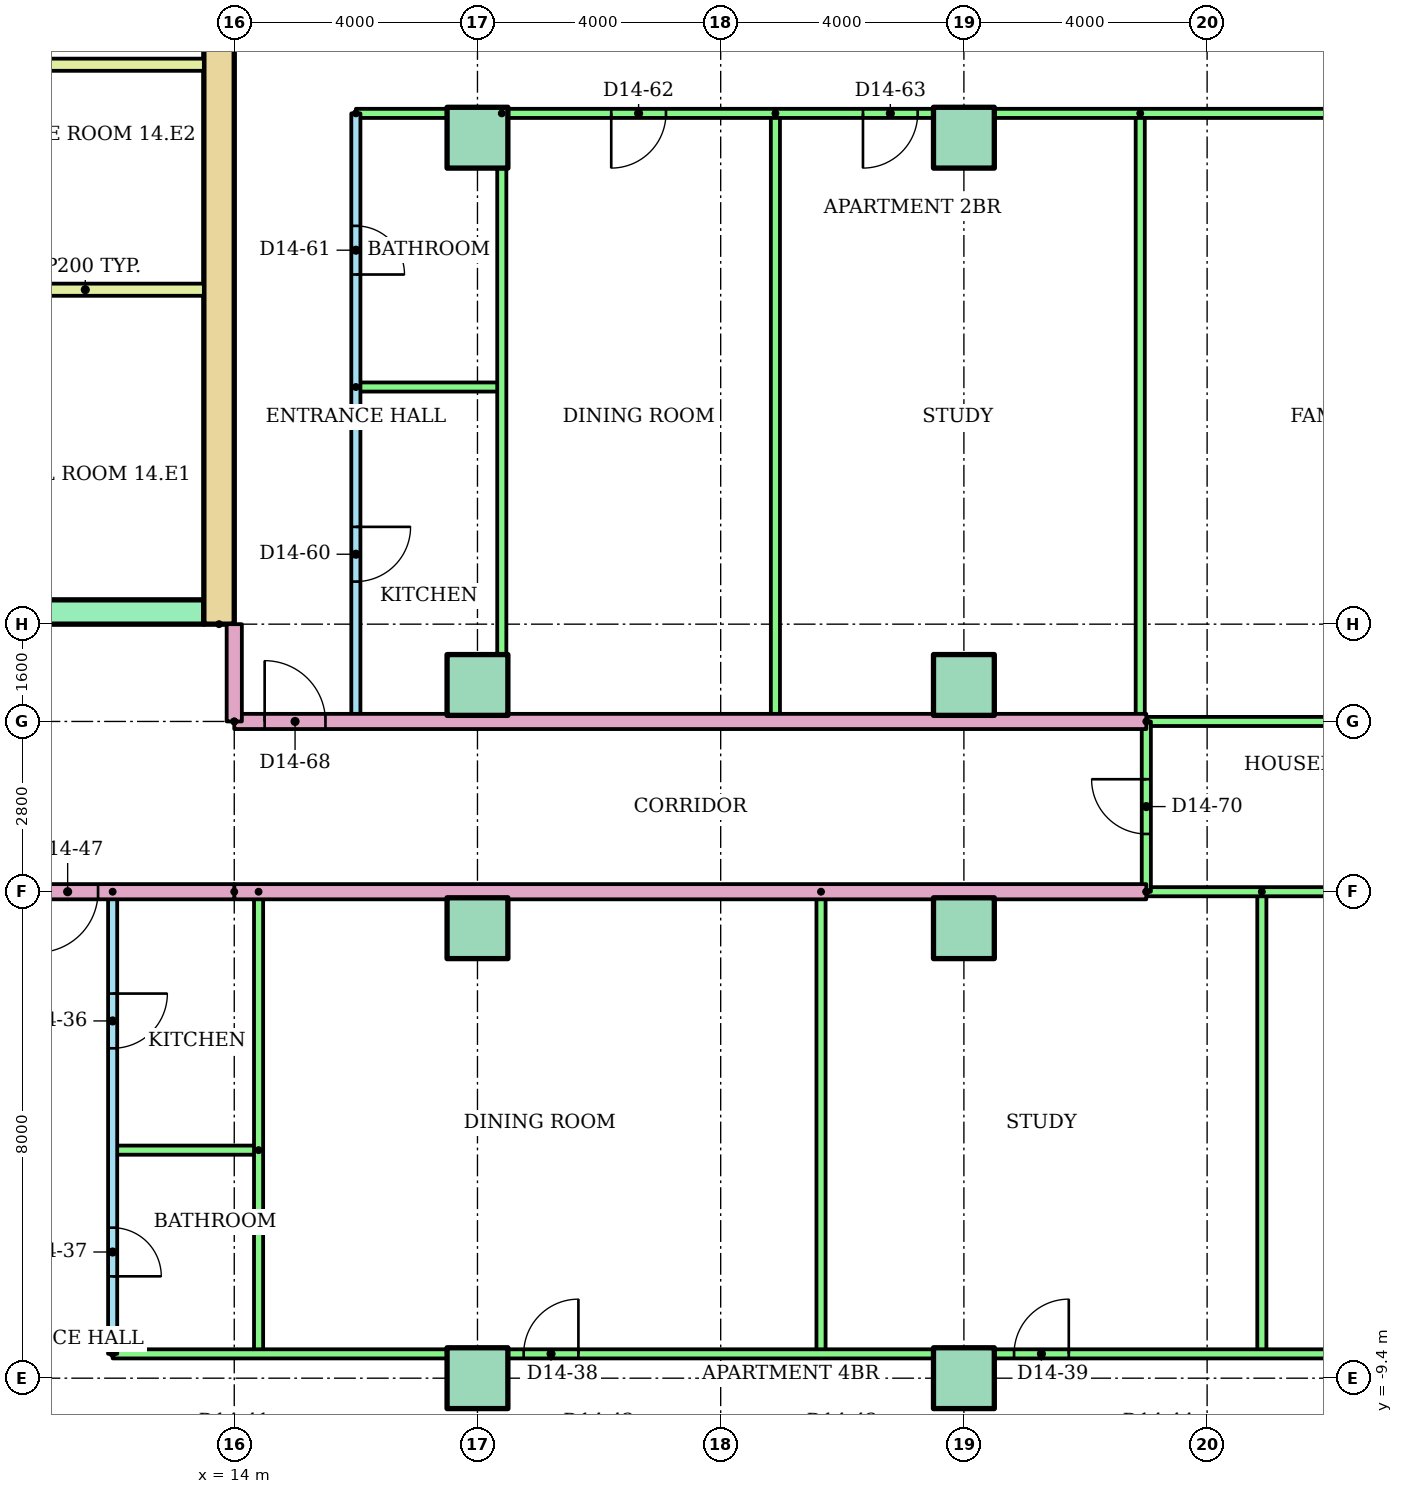
"""IFC4 building model, lengths in metres.
Left out: names, types, materials, properties, quantities, classifications, styles, units other than length and angle.
Written with IfcOpenShell. Run it as: python <this file> out.ifc"""

import sys

from ifc_helpers import new_model, si_unit, direction, frame, frame_2d, origin, origin_2d, place, context, subcontext, project, spatial, rectangle, extrude, element, fill, save


model = new_model("IFC4")
c1 = context("Model", 3, precision=1e-05, world=origin(), true_north=direction((0.0, 1.0)))
c2 = subcontext(c1, "Body", "Model", "MODEL_VIEW")
j1 = project(units=[si_unit("LENGTHUNIT", "METRE"), si_unit("PLANEANGLEUNIT", "RADIAN")], contexts=[c1])
p1 = place(None, origin())
s1 = spatial("IfcSite", under=j1, at=p1, CompositionType="ELEMENT")
p2 = place(p1, origin())
s2 = spatial("IfcBuilding", under=s1, at=p2, CompositionType="ELEMENT")
p3 = place(p2, frame((0.0, 0.0, 54.4)))
s3 = spatial("IfcBuildingStorey", under=s2, at=p3, CompositionType="ELEMENT", Elevation=54.4)
for number, where in (
    (1, (18.0, -9.4, 0.0)),
    (2, (26.0, -9.4, 0.0)),
    (3, (18.0, -2.0, 0.0)),
    (4, (26.0, -2.0, 0.0)),
    (5, (18.0, 2.0, 0.0)),
    (6, (26.0, 2.0, 0.0)),
    (7, (18.0, 11.0, 0.0)),
    (8, (26.0, 11.0, 0.0)),
):
    element("IfcColumn", number, at=place(p3, frame(where)), inside=s3, PredefinedType="COLUMN", context=c2, shape_type="SweptSolid", body=[
        extrude(rectangle(XDim=1.0, YDim=1.0, at=origin_2d()), origin(), (0.0, 0.0, 1.0), 3.2),
    ])
p4 = place(p3, frame((13.75, 3.0, 0.0), z_axis=(0.0, 0.0, 1.0), x_axis=(0.0, 1.0, 0.0)))
e9 = element("IfcWall", 9, at=p4, inside=s3, PredefinedType="SHEAR", context=c2, shape_type="SweptSolid", body=[
    extrude(rectangle(XDim=17.0, YDim=0.5, at=frame_2d((8.5, 0.0))), origin(), (0.0, 0.0, 1.0), 2.92),
])
p5 = place(p3, frame((-13.5, 3.2, 0.0)))
e10 = element("IfcWall", 10, at=p5, inside=s3, PredefinedType="SHEAR", context=c2, shape_type="SweptSolid", body=[
    extrude(rectangle(XDim=27.0, YDim=0.4, at=frame_2d((13.5, 0.0))), origin(), (0.0, 0.0, 1.0), 2.92),
])
p6 = place(p5, frame((6.861, 0.0, 0.0)))
e11 = element("IfcOpeningElement", 11, at=p6, cuts=e10, PredefinedType="OPENING", context=c2, shape_type="SweptSolid", body=[
    extrude(rectangle(XDim=1.1, YDim=2.1, at=frame_2d((0.55, 1.05))), frame((0.0, 0.21, 0.0), z_axis=(0.0, -1.0, 0.0), x_axis=(1.0, 0.0, 0.0)), (0.0, 0.0, 1.0), 0.42),
])
p7 = place(p5, frame((9.906, 0.0, 0.0)))
e12 = element("IfcOpeningElement", 12, at=p7, cuts=e10, PredefinedType="OPENING", context=c2, shape_type="SweptSolid", body=[
    extrude(rectangle(XDim=1.1, YDim=2.1, at=frame_2d((0.55, 1.05))), frame((0.0, 0.21, 0.0), z_axis=(0.0, -1.0, 0.0), x_axis=(1.0, 0.0, 0.0)), (0.0, 0.0, 1.0), 0.42),
])
p8 = place(p5, frame((15.994, 0.0, 0.0)))
e13 = element("IfcOpeningElement", 13, at=p8, cuts=e10, PredefinedType="OPENING", context=c2, shape_type="SweptSolid", body=[
    extrude(rectangle(XDim=1.1, YDim=2.1, at=frame_2d((0.55, 1.05))), frame((0.0, 0.21, 0.0), z_axis=(0.0, -1.0, 0.0), x_axis=(1.0, 0.0, 0.0)), (0.0, 0.0, 1.0), 0.42),
])
p9 = place(p5, frame((19.039, 0.0, 0.0)))
e14 = element("IfcOpeningElement", 14, at=p9, cuts=e10, PredefinedType="OPENING", context=c2, shape_type="SweptSolid", body=[
    extrude(rectangle(XDim=1.1, YDim=2.1, at=frame_2d((0.55, 1.05))), frame((0.0, 0.21, 0.0), z_axis=(0.0, -1.0, 0.0), x_axis=(1.0, 0.0, 0.0)), (0.0, 0.0, 1.0), 0.42),
])
p10 = place(p5, frame((12.6, 0.0, 0.0)))
e15 = element("IfcOpeningElement", 15, at=p10, cuts=e10, PredefinedType="OPENING", context=c2, shape_type="SweptSolid", body=[
    extrude(rectangle(XDim=1.8, YDim=2.1, at=frame_2d((0.9, 1.05))), frame((0.0, 0.21, 0.0), z_axis=(0.0, -1.0, 0.0), x_axis=(1.0, 0.0, 0.0)), (0.0, 0.0, 1.0), 0.42),
])
for number, where in (
    (16, (9.6, 8.5, 0.0)),
    (17, (9.6, 12.2, 0.0)),
):
    element("IfcWall", number, at=place(p3, frame(where)), inside=s3, PredefinedType="PARTITIONING", context=c2, shape_type="SweptSolid", body=[
        extrude(rectangle(XDim=3.9, YDim=0.2, at=frame_2d((1.95, 0.0))), origin(), (0.0, 0.0, 1.0), 2.92),
    ])
p11 = place(p3, frame((12.0, -1.4, 0.0), z_axis=(0.0, 0.0, 1.0), x_axis=(0.0, -1.0, 0.0)))
e18 = element("IfcWall", 18, at=p11, inside=s3, PredefinedType="PARTITIONING", context=c2, shape_type="SweptSolid", body=[
    extrude(rectangle(XDim=7.6, YDim=0.15, at=frame_2d((3.8, 0.0))), origin(), (0.0, 0.0, 1.0), 2.4),
])
p12 = place(p11, frame((1.675, 0.0, 0.0)))
e19 = element("IfcOpeningElement", 19, at=p12, cuts=e18, PredefinedType="OPENING", context=c2, shape_type="SweptSolid", body=[
    extrude(rectangle(XDim=0.9, YDim=2.1, at=frame_2d((0.45, 1.05))), frame((0.0, 0.085, 0.0), z_axis=(0.0, -1.0, 0.0), x_axis=(1.0, 0.0, 0.0)), (0.0, 0.0, 1.0), 0.17),
])
p13 = place(p11, frame((5.525, 0.0, 0.0)))
e20 = element("IfcOpeningElement", 20, at=p13, cuts=e18, PredefinedType="OPENING", context=c2, shape_type="SweptSolid", body=[
    extrude(rectangle(XDim=0.8, YDim=2.1, at=frame_2d((0.4, 1.05))), frame((0.0, 0.085, 0.0), z_axis=(0.0, -1.0, 0.0), x_axis=(1.0, 0.0, 0.0)), (0.0, 0.0, 1.0), 0.17),
])
p14 = place(p3, frame((14.4, -5.65, 0.0), z_axis=(0.0, 0.0, 1.0), x_axis=(-1.0, 0.0, 0.0)))
e21 = element("IfcWall", 21, at=p14, inside=s3, PredefinedType="PARTITIONING", context=c2, shape_type="SweptSolid", body=[
    extrude(rectangle(XDim=2.4, YDim=0.15, at=frame_2d((1.2, 0.0))), origin(), (0.0, 0.0, 1.0), 2.4),
])
for number, where, z_axis, x_axis in (
    (22, (14.4, -1.4, 0.0), (0.0, 0.0, 1.0), (0.0, -1.0, 0.0)),
    (23, (23.65, -1.4, 0.0), (0.0, 0.0, 1.0), (0.0, -1.0, 0.0)),
    (24, (30.9, -1.4, 0.0), (0.0, 0.0, 1.0), (0.0, -1.0, 0.0)),
):
    element("IfcWall", number, at=place(p3, frame(where, z_axis=z_axis, x_axis=x_axis)), inside=s3, PredefinedType="PARTITIONING", context=c2, shape_type="SweptSolid", body=[
        extrude(rectangle(XDim=7.6, YDim=0.15, at=frame_2d((3.8, 0.0))), origin(), (0.0, 0.0, 1.0), 2.4),
    ])
p15 = place(p3, frame((12.0, -9.0, 0.0)))
e25 = element("IfcWall", 25, at=p15, inside=s3, PredefinedType="PARTITIONING", context=c2, shape_type="SweptSolid", body=[
    extrude(rectangle(XDim=24.52, YDim=0.15, at=frame_2d((12.26, 0.0))), origin(), (0.0, 0.0, 1.0), 2.4),
])
p16 = place(p15, frame((6.76, 0.0, 0.0)))
e26 = element("IfcOpeningElement", 26, at=p16, cuts=e25, PredefinedType="OPENING", context=c2, shape_type="SweptSolid", body=[
    extrude(rectangle(XDim=0.9, YDim=2.1, at=frame_2d((0.45, 1.05))), frame((0.0, 0.085, 0.0), z_axis=(0.0, -1.0, 0.0), x_axis=(1.0, 0.0, 0.0)), (0.0, 0.0, 1.0), 0.17),
])
p17 = place(p15, frame((14.825, 0.0, 0.0)))
e27 = element("IfcOpeningElement", 27, at=p17, cuts=e25, PredefinedType="OPENING", context=c2, shape_type="SweptSolid", body=[
    extrude(rectangle(XDim=0.9, YDim=2.1, at=frame_2d((0.45, 1.05))), frame((0.0, 0.085, 0.0), z_axis=(0.0, -1.0, 0.0), x_axis=(1.0, 0.0, 0.0)), (0.0, 0.0, 1.0), 0.17),
])
p18 = place(p15, frame((20.34, 0.0, 0.0)))
e28 = element("IfcOpeningElement", 28, at=p18, cuts=e25, PredefinedType="OPENING", context=c2, shape_type="SweptSolid", body=[
    extrude(rectangle(XDim=0.9, YDim=2.1, at=frame_2d((0.45, 1.05))), frame((0.0, 0.085, 0.0), z_axis=(0.0, -1.0, 0.0), x_axis=(1.0, 0.0, 0.0)), (0.0, 0.0, 1.0), 0.17),
])
p19 = place(p3, frame((29.0, -1.4, 0.0), z_axis=(0.0, 0.0, 1.0), x_axis=(-1.0, 0.0, 0.0)))
e29 = element("IfcWall", 29, at=p19, inside=s3, PredefinedType="PARTITIONING", context=c2, shape_type="SweptSolid", body=[
    extrude(rectangle(XDim=15.0, YDim=0.25, at=frame_2d((7.5, 0.0))), origin(), (0.0, 0.0, 1.0), 2.4),
])
p20 = place(p3, frame((36.52, -1.4, 0.0), z_axis=(0.0, 0.0, 1.0), x_axis=(-1.0, 0.0, 0.0)))
e30 = element("IfcWall", 30, at=p20, inside=s3, PredefinedType="PARTITIONING", context=c2, shape_type="SweptSolid", body=[
    extrude(rectangle(XDim=7.52, YDim=0.15, at=frame_2d((3.76, 0.0))), origin(), (0.0, 0.0, 1.0), 2.4),
])
p21 = place(p3, frame((16.0, 11.4, 0.0), z_axis=(0.0, 0.0, 1.0), x_axis=(0.0, -1.0, 0.0)))
e31 = element("IfcWall", 31, at=p21, inside=s3, PredefinedType="PARTITIONING", context=c2, shape_type="SweptSolid", body=[
    extrude(rectangle(XDim=10.0, YDim=0.15, at=frame_2d((5.0, 0.0))), origin(), (0.0, 0.0, 1.0), 2.4),
])
p22 = place(p21, frame((6.8, 0.0, 0.0)))
e32 = element("IfcOpeningElement", 32, at=p22, cuts=e31, PredefinedType="OPENING", context=c2, shape_type="SweptSolid", body=[
    extrude(rectangle(XDim=0.9, YDim=2.1, at=frame_2d((0.45, 1.05))), frame((0.0, 0.085, 0.0), z_axis=(0.0, -1.0, 0.0), x_axis=(1.0, 0.0, 0.0)), (0.0, 0.0, 1.0), 0.17),
])
p23 = place(p21, frame((1.85, 0.0, 0.0)))
e33 = element("IfcOpeningElement", 33, at=p23, cuts=e31, PredefinedType="OPENING", context=c2, shape_type="SweptSolid", body=[
    extrude(rectangle(XDim=0.8, YDim=2.1, at=frame_2d((0.4, 1.05))), frame((0.0, 0.085, 0.0), z_axis=(0.0, -1.0, 0.0), x_axis=(1.0, 0.0, 0.0)), (0.0, 0.0, 1.0), 0.17),
])
p24 = place(p3, frame((16.0, 6.9, 0.0)))
e34 = element("IfcWall", 34, at=p24, inside=s3, PredefinedType="PARTITIONING", context=c2, shape_type="SweptSolid", body=[
    extrude(rectangle(XDim=2.4, YDim=0.15, at=frame_2d((1.2, 0.0))), origin(), (0.0, 0.0, 1.0), 2.4),
])
for number, where, z_axis, x_axis in (
    (35, (18.4, 11.4, 0.0), (0.0, 0.0, 1.0), (0.0, -1.0, 0.0)),
    (36, (22.9, 11.4, 0.0), (0.0, 0.0, 1.0), (0.0, -1.0, 0.0)),
    (37, (28.9, 11.4, 0.0), (0.0, 0.0, 1.0), (0.0, -1.0, 0.0)),
):
    element("IfcWall", number, at=place(p3, frame(where, z_axis=z_axis, x_axis=x_axis)), inside=s3, PredefinedType="PARTITIONING", context=c2, shape_type="SweptSolid", body=[
        extrude(rectangle(XDim=10.0, YDim=0.15, at=frame_2d((5.0, 0.0))), origin(), (0.0, 0.0, 1.0), 2.4),
    ])
p25 = place(p3, frame((36.52, 11.4, 0.0), z_axis=(0.0, 0.0, 1.0), x_axis=(-1.0, 0.0, 0.0)))
e38 = element("IfcWall", 38, at=p25, inside=s3, PredefinedType="PARTITIONING", context=c2, shape_type="SweptSolid", body=[
    extrude(rectangle(XDim=20.52, YDim=0.15, at=frame_2d((10.26, 0.0))), origin(), (0.0, 0.0, 1.0), 2.4),
])
p26 = place(p25, frame((15.42, 0.0, 0.0)))
e39 = element("IfcOpeningElement", 39, at=p26, cuts=e38, PredefinedType="OPENING", context=c2, shape_type="SweptSolid", body=[
    extrude(rectangle(XDim=0.9, YDim=2.1, at=frame_2d((0.45, 1.05))), frame((0.0, 0.085, 0.0), z_axis=(0.0, -1.0, 0.0), x_axis=(1.0, 0.0, 0.0)), (0.0, 0.0, 1.0), 0.17),
])
p27 = place(p25, frame((11.28, 0.0, 0.0)))
e40 = element("IfcOpeningElement", 40, at=p27, cuts=e38, PredefinedType="OPENING", context=c2, shape_type="SweptSolid", body=[
    extrude(rectangle(XDim=0.9, YDim=2.1, at=frame_2d((0.45, 1.05))), frame((0.0, 0.085, 0.0), z_axis=(0.0, -1.0, 0.0), x_axis=(1.0, 0.0, 0.0)), (0.0, 0.0, 1.0), 0.17),
])
p28 = place(p25, frame((3.47, 0.0, 0.0)))
e41 = element("IfcOpeningElement", 41, at=p28, cuts=e38, PredefinedType="OPENING", context=c2, shape_type="SweptSolid", body=[
    extrude(rectangle(XDim=0.9, YDim=2.1, at=frame_2d((0.45, 1.05))), frame((0.0, 0.085, 0.0), z_axis=(0.0, -1.0, 0.0), x_axis=(1.0, 0.0, 0.0)), (0.0, 0.0, 1.0), 0.17),
])
p29 = place(p3, frame((14.0, 1.4, 0.0)))
e42 = element("IfcWall", 42, at=p29, inside=s3, PredefinedType="PARTITIONING", context=c2, shape_type="SweptSolid", body=[
    extrude(rectangle(XDim=15.0, YDim=0.25, at=frame_2d((7.5, 0.0))), origin(), (0.0, 0.0, 1.0), 2.4),
])
p30 = place(p29, frame((0.5, 0.0, 0.0)))
e43 = element("IfcOpeningElement", 43, at=p30, cuts=e42, PredefinedType="OPENING", context=c2, shape_type="SweptSolid", body=[
    extrude(rectangle(XDim=1.0, YDim=2.1, at=frame_2d((0.5, 1.05))), frame((0.0, 0.135, 0.0), z_axis=(0.0, -1.0, 0.0), x_axis=(1.0, 0.0, 0.0)), (0.0, 0.0, 1.0), 0.27),
])
p31 = place(p3, frame((29.0, 1.4, 0.0)))
e44 = element("IfcWall", 44, at=p31, inside=s3, PredefinedType="PARTITIONING", context=c2, shape_type="SweptSolid", body=[
    extrude(rectangle(XDim=7.52, YDim=0.15, at=frame_2d((3.76, 0.0))), origin(), (0.0, 0.0, 1.0), 2.4),
])
p32 = place(p3, frame((29.0, -1.4, 0.0), z_axis=(0.0, 0.0, 1.0), x_axis=(0.0, 1.0, 0.0)))
e45 = element("IfcWall", 45, at=p32, inside=s3, PredefinedType="PARTITIONING", context=c2, shape_type="SweptSolid", body=[
    extrude(rectangle(XDim=2.8, YDim=0.15, at=frame_2d((1.4, 0.0))), origin(), (0.0, 0.0, 1.0), 2.4),
])
p33 = place(p32, frame((0.95, 0.0, 0.0)))
e46 = element("IfcOpeningElement", 46, at=p33, cuts=e45, PredefinedType="OPENING", context=c2, shape_type="SweptSolid", body=[
    extrude(rectangle(XDim=0.9, YDim=2.1, at=frame_2d((0.45, 1.05))), frame((0.0, 0.085, 0.0), z_axis=(0.0, -1.0, 0.0), x_axis=(1.0, 0.0, 0.0)), (0.0, 0.0, 1.0), 0.17),
])
p34 = place(p3, frame((14.0, -1.4, 0.0), z_axis=(0.0, 0.0, 1.0), x_axis=(-1.0, 0.0, 0.0)))
e47 = element("IfcWall", 47, at=p34, inside=s3, PredefinedType="PARTITIONING", context=c2, shape_type="SweptSolid", body=[
    extrude(rectangle(XDim=28.0, YDim=0.25, at=frame_2d((14.0, 0.0))), origin(), (0.0, 0.0, 1.0), 2.4),
])
p35 = place(p34, frame((4.76, 0.0, 0.0)))
e48 = element("IfcOpeningElement", 48, at=p35, cuts=e47, PredefinedType="OPENING", context=c2, shape_type="SweptSolid", body=[
    extrude(rectangle(XDim=1.0, YDim=2.1, at=frame_2d((0.5, 1.05))), frame((0.0, 0.135, 0.0), z_axis=(0.0, -1.0, 0.0), x_axis=(1.0, 0.0, 0.0)), (0.0, 0.0, 1.0), 0.27),
])
p36 = place(p34, frame((2.24, 0.0, 0.0)))
e49 = element("IfcOpeningElement", 49, at=p36, cuts=e47, PredefinedType="OPENING", context=c2, shape_type="SweptSolid", body=[
    extrude(rectangle(XDim=1.0, YDim=2.1, at=frame_2d((0.5, 1.05))), frame((0.0, 0.135, 0.0), z_axis=(0.0, -1.0, 0.0), x_axis=(1.0, 0.0, 0.0)), (0.0, 0.0, 1.0), 0.27),
])
p37 = place(p3, frame((14.0, 1.4, 0.0), z_axis=(0.0, 0.0, 1.0), x_axis=(0.0, 1.0, 0.0)))
e50 = element("IfcWall", 50, at=p37, inside=s3, PredefinedType="PARTITIONING", context=c2, shape_type="SweptSolid", body=[
    extrude(rectangle(XDim=1.6, YDim=0.25, at=frame_2d((0.8, 0.0))), origin(), (0.0, 0.0, 1.0), 2.4),
])
p38 = place(p12, origin())
e51 = element("IfcDoor", 51, at=p38, inside=s3, OperationType="SINGLE_SWING_LEFT", PredefinedType="DOOR", context=c2, shape_type="SweptSolid", body=[
    extrude(rectangle(XDim=0.9, YDim=2.1, at=frame_2d((0.45, 1.05))), frame((0.0, 0.025, 0.0), z_axis=(0.0, -1.0, 0.0), x_axis=(1.0, 0.0, 0.0)), (0.0, 0.0, 1.0), 0.05),
])
fill(e19, e51)
p39 = place(p13, origin())
e52 = element("IfcDoor", 52, at=p39, inside=s3, OperationType="SINGLE_SWING_RIGHT", PredefinedType="DOOR", context=c2, shape_type="SweptSolid", body=[
    extrude(rectangle(XDim=0.8, YDim=2.1, at=frame_2d((0.4, 1.05))), frame((0.0, 0.025, 0.0), z_axis=(0.0, -1.0, 0.0), x_axis=(1.0, 0.0, 0.0)), (0.0, 0.0, 1.0), 0.05),
])
fill(e20, e52)
p40 = place(p16, origin())
e53 = element("IfcDoor", 53, at=p40, inside=s3, OperationType="SINGLE_SWING_RIGHT", PredefinedType="DOOR", context=c2, shape_type="SweptSolid", body=[
    extrude(rectangle(XDim=0.9, YDim=2.1, at=frame_2d((0.45, 1.05))), frame((0.0, 0.025, 0.0), z_axis=(0.0, -1.0, 0.0), x_axis=(1.0, 0.0, 0.0)), (0.0, 0.0, 1.0), 0.05),
])
fill(e26, e53)
p41 = place(p17, origin())
e54 = element("IfcDoor", 54, at=p41, inside=s3, OperationType="SINGLE_SWING_RIGHT", PredefinedType="DOOR", context=c2, shape_type="SweptSolid", body=[
    extrude(rectangle(XDim=0.9, YDim=2.1, at=frame_2d((0.45, 1.05))), frame((0.0, 0.025, 0.0), z_axis=(0.0, -1.0, 0.0), x_axis=(1.0, 0.0, 0.0)), (0.0, 0.0, 1.0), 0.05),
])
fill(e27, e54)
p42 = place(p36, origin())
e55 = element("IfcDoor", 55, at=p42, inside=s3, OperationType="SINGLE_SWING_RIGHT", PredefinedType="DOOR", context=c2, shape_type="SweptSolid", body=[
    extrude(rectangle(XDim=1.0, YDim=2.1, at=frame_2d((0.5, 1.05))), frame((0.0, 0.025, 0.0), z_axis=(0.0, -1.0, 0.0), x_axis=(1.0, 0.0, 0.0)), (0.0, 0.0, 1.0), 0.05),
])
fill(e49, e55)
p43 = place(p22, origin())
e56 = element("IfcDoor", 56, at=p43, inside=s3, OperationType="SINGLE_SWING_LEFT", PredefinedType="DOOR", context=c2, shape_type="SweptSolid", body=[
    extrude(rectangle(XDim=0.9, YDim=2.1, at=frame_2d((0.45, 1.05))), frame((0.0, 0.025, 0.0), z_axis=(0.0, -1.0, 0.0), x_axis=(1.0, 0.0, 0.0)), (0.0, 0.0, 1.0), 0.05),
])
fill(e32, e56)
p44 = place(p23, origin())
e57 = element("IfcDoor", 57, at=p44, inside=s3, OperationType="SINGLE_SWING_RIGHT", PredefinedType="DOOR", context=c2, shape_type="SweptSolid", body=[
    extrude(rectangle(XDim=0.8, YDim=2.1, at=frame_2d((0.4, 1.05))), frame((0.0, 0.025, 0.0), z_axis=(0.0, -1.0, 0.0), x_axis=(1.0, 0.0, 0.0)), (0.0, 0.0, 1.0), 0.05),
])
fill(e33, e57)
p45 = place(p26, origin())
e58 = element("IfcDoor", 58, at=p45, inside=s3, OperationType="SINGLE_SWING_RIGHT", PredefinedType="DOOR", context=c2, shape_type="SweptSolid", body=[
    extrude(rectangle(XDim=0.9, YDim=2.1, at=frame_2d((0.45, 1.05))), frame((0.0, 0.025, 0.0), z_axis=(0.0, -1.0, 0.0), x_axis=(1.0, 0.0, 0.0)), (0.0, 0.0, 1.0), 0.05),
])
fill(e39, e58)
p46 = place(p27, origin())
e59 = element("IfcDoor", 59, at=p46, inside=s3, OperationType="SINGLE_SWING_RIGHT", PredefinedType="DOOR", context=c2, shape_type="SweptSolid", body=[
    extrude(rectangle(XDim=0.9, YDim=2.1, at=frame_2d((0.45, 1.05))), frame((0.0, 0.025, 0.0), z_axis=(0.0, -1.0, 0.0), x_axis=(1.0, 0.0, 0.0)), (0.0, 0.0, 1.0), 0.05),
])
fill(e40, e59)
p47 = place(p30, origin())
e60 = element("IfcDoor", 60, at=p47, inside=s3, OperationType="SINGLE_SWING_LEFT", PredefinedType="DOOR", context=c2, shape_type="SweptSolid", body=[
    extrude(rectangle(XDim=1.0, YDim=2.1, at=frame_2d((0.5, 1.05))), frame((0.0, 0.025, 0.0), z_axis=(0.0, -1.0, 0.0), x_axis=(1.0, 0.0, 0.0)), (0.0, 0.0, 1.0), 0.05),
])
fill(e43, e60)
p48 = place(p33, origin())
e61 = element("IfcDoor", 61, at=p48, inside=s3, OperationType="SINGLE_SWING_RIGHT", PredefinedType="DOOR", context=c2, shape_type="SweptSolid", body=[
    extrude(rectangle(XDim=0.9, YDim=2.1, at=frame_2d((0.45, 1.05))), frame((0.0, 0.025, 0.0), z_axis=(0.0, -1.0, 0.0), x_axis=(1.0, 0.0, 0.0)), (0.0, 0.0, 1.0), 0.05),
])
fill(e46, e61)
save(model, sys.argv[1])
